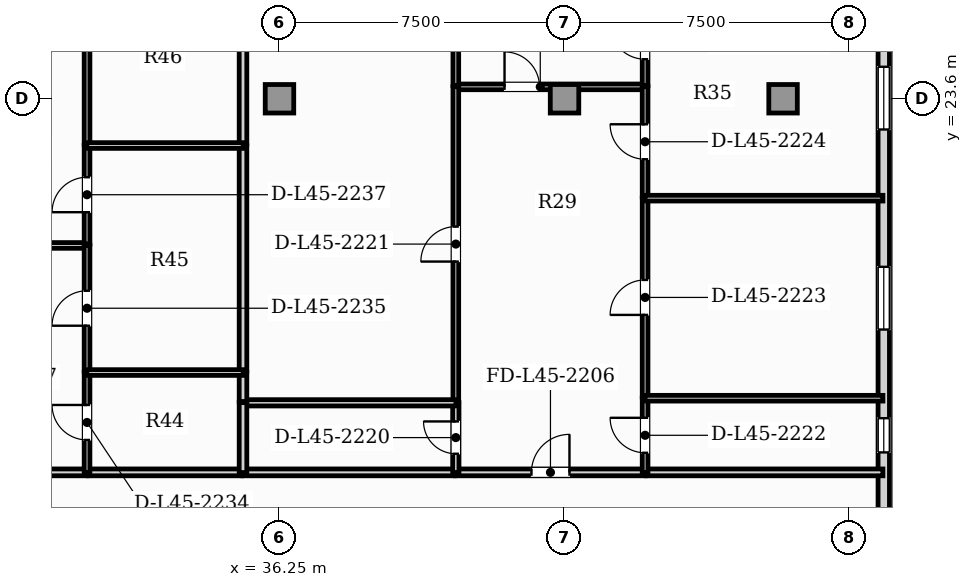
"""IFC4 building model, lengths in metres.
Left out: names, types, materials, properties, quantities, classifications, styles, units other than length and angle.
Written with IfcOpenShell. Run it as: python <this file> out.ifc"""

import sys

from ifc_helpers import new_model, si_unit, direction, frame, frame_2d, origin, origin_2d, place, context, subcontext, project, spatial, rectangle, extrude, element, fill, save


model = new_model("IFC4")
c1 = context("Model", 3, precision=1e-05, world=origin(), true_north=direction((0.0, 1.0)))
c2 = subcontext(c1, "Body", "Model", "MODEL_VIEW")
j1 = project(units=[si_unit("LENGTHUNIT", "METRE"), si_unit("PLANEANGLEUNIT", "RADIAN")], contexts=[c1])
p1 = place(None, origin())
s1 = spatial("IfcSite", under=j1, at=p1, CompositionType="ELEMENT")
p2 = place(p1, origin())
s2 = spatial("IfcBuilding", under=s1, at=p2, CompositionType="ELEMENT")
p3 = place(p2, frame((0.0, 0.0, 183.7)))
s3 = spatial("IfcBuildingStorey", under=s2, at=p3, CompositionType="ELEMENT", Elevation=183.7)
for number, where, z_axis, x_axis in (
    (1, (36.25, 23.6, 0.0), (0.0, 0.0, 1.0), (1.0, 0.0, 0.0)),
    (2, (43.75, 23.6, 0.0), (0.0, 0.0, 1.0), (1.0, 0.0, 0.0)),
    (3, (49.5, 23.6, 0.0), (0.0, 0.0, 1.0), (1.0, 0.0, 0.0)),
):
    element("IfcColumn", number, at=place(p3, frame(where, z_axis=z_axis, x_axis=x_axis)), inside=s3, PredefinedType="COLUMN", context=c2, shape_type="SweptSolid", body=[
        extrude(rectangle(XDim=0.75, YDim=0.75, at=origin_2d()), origin(), (0.0, 0.0, 1.0), 3.85),
    ])
p4 = place(p3, frame((52.15, 3.24, 0.0), z_axis=(0.0, 0.0, 1.0), x_axis=(0.0, 1.0, 0.0)))
e4 = element("IfcWall", 4, at=p4, inside=s3, PredefinedType="SOLIDWALL", context=c2, shape_type="SweptSolid", body=[
    extrude(rectangle(XDim=33.92, YDim=0.3, at=frame_2d((16.96, 0.0))), origin(), (0.0, 0.0, 1.0), 3.63),
])
p5 = place(p4, frame((30.56, 0.0, 0.95)))
e5 = element("IfcOpeningElement", 5, at=p5, cuts=e4, PredefinedType="OPENING", context=c2, shape_type="SweptSolid", body=[
    extrude(rectangle(XDim=0.9, YDim=1.5, at=frame_2d((0.45, 0.75))), frame((0.0, 0.16, 0.0), z_axis=(0.0, -1.0, 0.0), x_axis=(1.0, 0.0, 0.0)), (0.0, 0.0, 1.0), 0.32),
])
p6 = place(p4, frame((11.056, 0.0, 0.95)))
e6 = element("IfcOpeningElement", 6, at=p6, cuts=e4, PredefinedType="OPENING", context=c2, shape_type="SweptSolid", body=[
    extrude(rectangle(XDim=0.9, YDim=1.5, at=frame_2d((0.45, 0.75))), frame((0.0, 0.16, 0.0), z_axis=(0.0, -1.0, 0.0), x_axis=(1.0, 0.0, 0.0)), (0.0, 0.0, 1.0), 0.32),
])
p7 = place(p4, frame((14.288, 0.0, 0.88)))
e7 = element("IfcOpeningElement", 7, at=p7, cuts=e4, PredefinedType="OPENING", context=c2, shape_type="SweptSolid", body=[
    extrude(rectangle(XDim=1.65, YDim=2.0, at=frame_2d((0.825, 1.0))), frame((0.0, 0.16, 0.0), z_axis=(0.0, -1.0, 0.0), x_axis=(1.0, 0.0, 0.0)), (0.0, 0.0, 1.0), 0.32),
])
p8 = place(p4, frame((19.552, 0.0, 0.88)))
e8 = element("IfcOpeningElement", 8, at=p8, cuts=e4, PredefinedType="OPENING", context=c2, shape_type="SweptSolid", body=[
    extrude(rectangle(XDim=1.65, YDim=2.0, at=frame_2d((0.825, 1.0))), frame((0.0, 0.16, 0.0), z_axis=(0.0, -1.0, 0.0), x_axis=(1.0, 0.0, 0.0)), (0.0, 0.0, 1.0), 0.32),
])
p9 = place(p4, frame((25.809, 0.0, 0.88)))
e9 = element("IfcOpeningElement", 9, at=p9, cuts=e4, PredefinedType="OPENING", context=c2, shape_type="SweptSolid", body=[
    extrude(rectangle(XDim=1.65, YDim=2.0, at=frame_2d((0.825, 1.0))), frame((0.0, 0.16, 0.0), z_axis=(0.0, -1.0, 0.0), x_axis=(1.0, 0.0, 0.0)), (0.0, 0.0, 1.0), 0.32),
])
p10 = place(p4, frame((32.24, 0.0, 0.95)))
e10 = element("IfcOpeningElement", 10, at=p10, cuts=e4, PredefinedType="OPENING", context=c2, shape_type="SweptSolid", body=[
    extrude(rectangle(XDim=0.9, YDim=1.5, at=frame_2d((0.45, 0.75))), frame((0.0, 0.16, 0.0), z_axis=(0.0, -1.0, 0.0), x_axis=(1.0, 0.0, 0.0)), (0.0, 0.0, 1.0), 0.32),
])
p11 = place(p3, frame((40.885, 13.77, 0.0), z_axis=(0.0, 0.0, 1.0), x_axis=(1.0, 0.0, 0.0)))
e11 = element("IfcWall", 11, at=p11, inside=s3, PredefinedType="PARTITIONING", context=c2, shape_type="SweptSolid", body=[
    extrude(rectangle(XDim=4.99, YDim=0.18, at=frame_2d((2.495, 0.0))), origin(), (0.0, 0.0, 1.0), 3.63),
])
p12 = place(p11, frame((1.995, 0.0, 0.0)))
e12 = element("IfcOpeningElement", 12, at=p12, cuts=e11, PredefinedType="OPENING", context=c2, shape_type="SweptSolid", body=[
    extrude(rectangle(XDim=1.0, YDim=2.15, at=frame_2d((0.5, 1.075))), frame((0.0, 0.1, 0.0), z_axis=(0.0, -1.0, 0.0), x_axis=(1.0, 0.0, 0.0)), (0.0, 0.0, 1.0), 0.2),
])
p13 = place(p3, frame((35.285, 13.77, 0.0), z_axis=(0.0, 0.0, 1.0), x_axis=(1.0, 0.0, 0.0)))
e13 = element("IfcWall", 13, at=p13, inside=s3, PredefinedType="PARTITIONING", context=c2, shape_type="SweptSolid", body=[
    extrude(rectangle(XDim=5.57, YDim=0.18, at=frame_2d((2.785, 0.0))), origin(), (0.0, 0.0, 1.0), 3.63),
])
p14 = place(p3, frame((45.905, 13.77, 0.0), z_axis=(0.0, 0.0, 1.0), x_axis=(1.0, 0.0, 0.0)))
e14 = element("IfcWall", 14, at=p14, inside=s3, PredefinedType="PARTITIONING", context=c2, shape_type="SweptSolid", body=[
    extrude(rectangle(XDim=6.222, YDim=0.18, at=frame_2d((3.111, 0.0))), origin(), (0.0, 0.0, 1.0), 3.63),
])
p15 = place(p3, frame((26.201, 13.77, 0.0), z_axis=(0.0, 0.0, 1.0), x_axis=(1.0, 0.0, 0.0)))
e15 = element("IfcWall", 15, at=p15, inside=s3, PredefinedType="PARTITIONING", context=c2, shape_type="SweptSolid", body=[
    extrude(rectangle(XDim=4.99, YDim=0.18, at=frame_2d((2.495, 0.0))), origin(), (0.0, 0.0, 1.0), 3.63),
])
p16 = place(p15, frame((1.995, 0.0, 0.0)))
e16 = element("IfcOpeningElement", 16, at=p16, cuts=e15, PredefinedType="OPENING", context=c2, shape_type="SweptSolid", body=[
    extrude(rectangle(XDim=1.0, YDim=2.15, at=frame_2d((0.5, 1.075))), frame((0.0, 0.1, 0.0), z_axis=(0.0, -1.0, 0.0), x_axis=(1.0, 0.0, 0.0)), (0.0, 0.0, 1.0), 0.2),
])
p17 = place(p3, frame((31.221, 13.77, 0.0), z_axis=(0.0, 0.0, 1.0), x_axis=(1.0, 0.0, 0.0)))
e17 = element("IfcWall", 17, at=p17, inside=s3, PredefinedType="PARTITIONING", context=c2, shape_type="SweptSolid", body=[
    extrude(rectangle(XDim=4.034, YDim=0.18, at=frame_2d((2.017, 0.0))), origin(), (0.0, 0.0, 1.0), 3.63),
])
p18 = place(p3, frame((40.885, 23.913, 0.0), z_axis=(0.0, 0.0, 1.0), x_axis=(1.0, 0.0, 0.0)))
e18 = element("IfcWall", 18, at=p18, inside=s3, PredefinedType="PARTITIONING", context=c2, shape_type="SweptSolid", body=[
    extrude(rectangle(XDim=4.99, YDim=0.15, at=frame_2d((2.495, 0.0))), origin(), (0.0, 0.0, 1.0), 3.63),
])
p19 = place(p18, frame((1.287, 0.0, 0.0)))
e19 = element("IfcOpeningElement", 19, at=p19, cuts=e18, PredefinedType="OPENING", context=c2, shape_type="SweptSolid", body=[
    extrude(rectangle(XDim=0.92, YDim=2.1, at=frame_2d((0.46, 1.05))), frame((0.0, 0.085, 0.0), z_axis=(0.0, -1.0, 0.0), x_axis=(1.0, 0.0, 0.0)), (0.0, 0.0, 1.0), 0.17),
])
p20 = place(p3, frame((40.89, 13.765, 0.0), z_axis=(0.0, 0.0, 1.0), x_axis=(0.0, 1.0, 0.0)))
e20 = element("IfcWall", 20, at=p20, inside=s3, PredefinedType="PLUMBINGWALL", context=c2, shape_type="SweptSolid", body=[
    extrude(rectangle(XDim=1.84, YDim=0.165, at=frame_2d((0.92, 0.0))), origin(), (0.0, 0.0, 1.0), 3.63),
])
p21 = place(p20, frame((0.495, 0.0, 0.0)))
e21 = element("IfcOpeningElement", 21, at=p21, cuts=e20, PredefinedType="OPENING", context=c2, shape_type="SweptSolid", body=[
    extrude(rectangle(XDim=0.85, YDim=2.1, at=frame_2d((0.425, 1.05))), frame((0.0, 0.093, 0.0), z_axis=(0.0, -1.0, 0.0), x_axis=(1.0, 0.0, 0.0)), (0.0, 0.0, 1.0), 0.185),
])
p22 = place(p3, frame((40.89, 15.635, 0.0), z_axis=(0.0, 0.0, 1.0), x_axis=(0.0, 1.0, 0.0)))
e22 = element("IfcWall", 22, at=p22, inside=s3, PredefinedType="PARTITIONING", context=c2, shape_type="SweptSolid", body=[
    extrude(rectangle(XDim=8.283, YDim=0.15, at=frame_2d((4.142, 0.0))), origin(), (0.0, 0.0, 1.0), 3.63),
])
p23 = place(p22, frame((3.682, 0.0, 0.0)))
e23 = element("IfcOpeningElement", 23, at=p23, cuts=e22, PredefinedType="OPENING", context=c2, shape_type="SweptSolid", body=[
    extrude(rectangle(XDim=0.92, YDim=2.1, at=frame_2d((0.46, 1.05))), frame((0.0, 0.085, 0.0), z_axis=(0.0, -1.0, 0.0), x_axis=(1.0, 0.0, 0.0)), (0.0, 0.0, 1.0), 0.17),
])
p24 = place(p3, frame((45.87, 13.765, 0.0), z_axis=(0.0, 0.0, 1.0), x_axis=(0.0, 1.0, 0.0)))
e24 = element("IfcWall", 24, at=p24, inside=s3, PredefinedType="PARTITIONING", context=c2, shape_type="SweptSolid", body=[
    extrude(rectangle(XDim=1.961, YDim=0.15, at=frame_2d((0.981, 0.0))), origin(), (0.0, 0.0, 1.0), 3.63),
])
p25 = place(p24, frame((0.521, 0.0, 0.0)))
e25 = element("IfcOpeningElement", 25, at=p25, cuts=e24, PredefinedType="OPENING", context=c2, shape_type="SweptSolid", body=[
    extrude(rectangle(XDim=0.92, YDim=2.1, at=frame_2d((0.46, 1.05))), frame((0.0, 0.085, 0.0), z_axis=(0.0, -1.0, 0.0), x_axis=(1.0, 0.0, 0.0)), (0.0, 0.0, 1.0), 0.17),
])
p26 = place(p3, frame((45.87, 15.756, 0.0), z_axis=(0.0, 0.0, 1.0), x_axis=(0.0, 1.0, 0.0)))
e26 = element("IfcWall", 26, at=p26, inside=s3, PredefinedType="PARTITIONING", context=c2, shape_type="SweptSolid", body=[
    extrude(rectangle(XDim=5.234, YDim=0.15, at=frame_2d((2.617, 0.0))), origin(), (0.0, 0.0, 1.0), 3.63),
])
p27 = place(p26, frame((2.157, 0.0, 0.0)))
e27 = element("IfcOpeningElement", 27, at=p27, cuts=e26, PredefinedType="OPENING", context=c2, shape_type="SweptSolid", body=[
    extrude(rectangle(XDim=0.92, YDim=2.1, at=frame_2d((0.46, 1.05))), frame((0.0, 0.085, 0.0), z_axis=(0.0, -1.0, 0.0), x_axis=(1.0, 0.0, 0.0)), (0.0, 0.0, 1.0), 0.17),
])
p28 = place(p3, frame((45.87, 21.02, 0.0), z_axis=(0.0, 0.0, 1.0), x_axis=(0.0, 1.0, 0.0)))
e28 = element("IfcWall", 28, at=p28, inside=s3, PredefinedType="PARTITIONING", context=c2, shape_type="SweptSolid", body=[
    extrude(rectangle(XDim=2.898, YDim=0.15, at=frame_2d((1.449, 0.0))), origin(), (0.0, 0.0, 1.0), 3.63),
])
p29 = place(p28, frame((0.989, 0.0, 0.0)))
e29 = element("IfcOpeningElement", 29, at=p29, cuts=e28, PredefinedType="OPENING", context=c2, shape_type="SweptSolid", body=[
    extrude(rectangle(XDim=0.92, YDim=2.1, at=frame_2d((0.46, 1.05))), frame((0.0, 0.085, 0.0), z_axis=(0.0, -1.0, 0.0), x_axis=(1.0, 0.0, 0.0)), (0.0, 0.0, 1.0), 0.17),
])
p30 = place(p3, frame((40.89, 23.948, 0.0), z_axis=(0.0, 0.0, 1.0), x_axis=(0.0, 1.0, 0.0)))
e30 = element("IfcWall", 30, at=p30, inside=s3, PredefinedType="PARTITIONING", context=c2, shape_type="SweptSolid", body=[
    extrude(rectangle(XDim=9.557, YDim=0.15, at=frame_2d((4.778, 0.0))), origin(), (0.0, 0.0, 1.0), 3.63),
])
p31 = place(p30, frame((4.318, 0.0, 0.0)))
e31 = element("IfcOpeningElement", 31, at=p31, cuts=e30, PredefinedType="OPENING", context=c2, shape_type="SweptSolid", body=[
    extrude(rectangle(XDim=0.92, YDim=2.1, at=frame_2d((0.46, 1.05))), frame((0.0, 0.085, 0.0), z_axis=(0.0, -1.0, 0.0), x_axis=(1.0, 0.0, 0.0)), (0.0, 0.0, 1.0), 0.17),
])
p32 = place(p3, frame((45.87, 23.948, 0.0), z_axis=(0.0, 0.0, 1.0), x_axis=(0.0, 1.0, 0.0)))
e32 = element("IfcWall", 32, at=p32, inside=s3, PredefinedType="PARTITIONING", context=c2, shape_type="SweptSolid", body=[
    extrude(rectangle(XDim=2.305, YDim=0.15, at=frame_2d((1.153, 0.0))), origin(), (0.0, 0.0, 1.0), 3.63),
])
p33 = place(p32, frame((0.693, 0.0, 0.0)))
e33 = element("IfcOpeningElement", 33, at=p33, cuts=e32, PredefinedType="OPENING", context=c2, shape_type="SweptSolid", body=[
    extrude(rectangle(XDim=0.92, YDim=2.1, at=frame_2d((0.46, 1.05))), frame((0.0, 0.085, 0.0), z_axis=(0.0, -1.0, 0.0), x_axis=(1.0, 0.0, 0.0)), (0.0, 0.0, 1.0), 0.17),
])
p34 = place(p3, frame((35.285, 15.6, 0.0), z_axis=(0.0, 0.0, 1.0), x_axis=(1.0, 0.0, 0.0)))
e34 = element("IfcWall", 34, at=p34, inside=s3, PredefinedType="PLUMBINGWALL", context=c2, shape_type="SweptSolid", body=[
    extrude(rectangle(XDim=5.61, YDim=0.165, at=frame_2d((2.805, 0.0))), origin(), (0.0, 0.0, 1.0), 3.63),
])
p35 = place(p3, frame((35.29, 13.765, 0.0), z_axis=(0.0, 0.0, 1.0), x_axis=(0.0, 1.0, 0.0)))
e35 = element("IfcWall", 35, at=p35, inside=s3, PredefinedType="PARTITIONING", context=c2, shape_type="SweptSolid", body=[
    extrude(rectangle(XDim=1.84, YDim=0.2, at=frame_2d((0.92, 0.0))), origin(), (0.0, 0.0, 1.0), 3.63),
])
p36 = place(p3, frame((35.29, 15.635, 0.0), z_axis=(0.0, 0.0, 1.0), x_axis=(0.0, 1.0, 0.0)))
e36 = element("IfcWall", 36, at=p36, inside=s3, PredefinedType="PARTITIONING", context=c2, shape_type="SweptSolid", body=[
    extrude(rectangle(XDim=0.767, YDim=0.2, at=frame_2d((0.383, 0.0))), origin(), (0.0, 0.0, 1.0), 3.63),
])
p37 = place(p3, frame((35.29, 16.432, 0.0), z_axis=(0.0, 0.0, 1.0), x_axis=(0.0, 1.0, 0.0)))
e37 = element("IfcWall", 37, at=p37, inside=s3, PredefinedType="PARTITIONING", context=c2, shape_type="SweptSolid", body=[
    extrude(rectangle(XDim=5.943, YDim=0.2, at=frame_2d((2.972, 0.0))), origin(), (0.0, 0.0, 1.0), 3.63),
])
p38 = place(p3, frame((35.29, 22.405, 0.0), z_axis=(0.0, 0.0, 1.0), x_axis=(0.0, 1.0, 0.0)))
e38 = element("IfcWall", 38, at=p38, inside=s3, PredefinedType="PARTITIONING", context=c2, shape_type="SweptSolid", body=[
    extrude(rectangle(XDim=7.74, YDim=0.2, at=frame_2d((3.87, 0.0))), origin(), (0.0, 0.0, 1.0), 3.63),
])
for number, where, z_axis, x_axis in (
    (39, (45.865, 15.721, 0.0), (0.0, 0.0, 1.0), (1.0, 0.0, 0.0)),
    (40, (45.865, 20.985, 0.0), (0.0, 0.0, 1.0), (1.0, 0.0, 0.0)),
):
    element("IfcWall", number, at=place(p3, frame(where, z_axis=z_axis, x_axis=x_axis)), inside=s3, PredefinedType="PARTITIONING", context=c2, shape_type="SweptSolid", body=[
        extrude(rectangle(XDim=6.262, YDim=0.15, at=frame_2d((3.131, 0.0))), origin(), (0.0, 0.0, 1.0), 3.63),
    ])
p39 = place(p3, frame((26.201, 19.741, 0.0), z_axis=(0.0, 0.0, 1.0), x_axis=(1.0, 0.0, 0.0)))
e41 = element("IfcWall", 41, at=p39, inside=s3, PredefinedType="PARTITIONING", context=c2, shape_type="SweptSolid", body=[
    extrude(rectangle(XDim=4.99, YDim=0.15, at=frame_2d((2.495, 0.0))), origin(), (0.0, 0.0, 1.0), 3.63),
])
p40 = place(p39, frame((2.035, 0.0, 0.0)))
e42 = element("IfcOpeningElement", 42, at=p40, cuts=e41, PredefinedType="OPENING", context=c2, shape_type="SweptSolid", body=[
    extrude(rectangle(XDim=0.92, YDim=2.1, at=frame_2d((0.46, 1.05))), frame((0.0, 0.085, 0.0), z_axis=(0.0, -1.0, 0.0), x_axis=(1.0, 0.0, 0.0)), (0.0, 0.0, 1.0), 0.17),
])
p41 = place(p3, frame((31.186, 13.765, 0.0), z_axis=(0.0, 0.0, 1.0), x_axis=(0.0, 1.0, 0.0)))
e43 = element("IfcWall", 43, at=p41, inside=s3, PredefinedType="PARTITIONING", context=c2, shape_type="SweptSolid", body=[
    extrude(rectangle(XDim=2.637, YDim=0.15, at=frame_2d((1.318, 0.0))), origin(), (0.0, 0.0, 1.0), 3.63),
])
p42 = place(p41, frame((0.858, 0.0, 0.0)))
e44 = element("IfcOpeningElement", 44, at=p42, cuts=e43, PredefinedType="OPENING", context=c2, shape_type="SweptSolid", body=[
    extrude(rectangle(XDim=0.92, YDim=2.1, at=frame_2d((0.46, 1.05))), frame((0.0, 0.085, 0.0), z_axis=(0.0, -1.0, 0.0), x_axis=(1.0, 0.0, 0.0)), (0.0, 0.0, 1.0), 0.17),
])
p43 = place(p3, frame((31.186, 16.432, 0.0), z_axis=(0.0, 0.0, 1.0), x_axis=(0.0, 1.0, 0.0)))
e45 = element("IfcWall", 45, at=p43, inside=s3, PredefinedType="PARTITIONING", context=c2, shape_type="SweptSolid", body=[
    extrude(rectangle(XDim=3.314, YDim=0.15, at=frame_2d((1.657, 0.0))), origin(), (0.0, 0.0, 1.0), 3.63),
])
p44 = place(p43, frame((1.197, 0.0, 0.0)))
e46 = element("IfcOpeningElement", 46, at=p44, cuts=e45, PredefinedType="OPENING", context=c2, shape_type="SweptSolid", body=[
    extrude(rectangle(XDim=0.92, YDim=2.1, at=frame_2d((0.46, 1.05))), frame((0.0, 0.085, 0.0), z_axis=(0.0, -1.0, 0.0), x_axis=(1.0, 0.0, 0.0)), (0.0, 0.0, 1.0), 0.17),
])
p45 = place(p3, frame((31.186, 19.776, 0.0), z_axis=(0.0, 0.0, 1.0), x_axis=(0.0, 1.0, 0.0)))
e47 = element("IfcWall", 47, at=p45, inside=s3, PredefinedType="PARTITIONING", context=c2, shape_type="SweptSolid", body=[
    extrude(rectangle(XDim=2.599, YDim=0.15, at=frame_2d((1.3, 0.0))), origin(), (0.0, 0.0, 1.0), 3.63),
])
p46 = place(p45, frame((0.84, 0.0, 0.0)))
e48 = element("IfcOpeningElement", 48, at=p46, cuts=e47, PredefinedType="OPENING", context=c2, shape_type="SweptSolid", body=[
    extrude(rectangle(XDim=0.92, YDim=2.1, at=frame_2d((0.46, 1.05))), frame((0.0, 0.085, 0.0), z_axis=(0.0, -1.0, 0.0), x_axis=(1.0, 0.0, 0.0)), (0.0, 0.0, 1.0), 0.17),
])
p47 = place(p3, frame((31.186, 22.405, 0.0), z_axis=(0.0, 0.0, 1.0), x_axis=(0.0, 1.0, 0.0)))
e49 = element("IfcWall", 49, at=p47, inside=s3, PredefinedType="PARTITIONING", context=c2, shape_type="SweptSolid", body=[
    extrude(rectangle(XDim=7.78, YDim=0.15, at=frame_2d((3.89, 0.0))), origin(), (0.0, 0.0, 1.0), 3.63),
])
p48 = place(p47, frame((3.43, 0.0, 0.0)))
e50 = element("IfcOpeningElement", 50, at=p48, cuts=e49, PredefinedType="OPENING", context=c2, shape_type="SweptSolid", body=[
    extrude(rectangle(XDim=0.92, YDim=2.1, at=frame_2d((0.46, 1.05))), frame((0.0, 0.085, 0.0), z_axis=(0.0, -1.0, 0.0), x_axis=(1.0, 0.0, 0.0)), (0.0, 0.0, 1.0), 0.17),
])
for number, where, z_axis, x_axis in (
    (51, (31.181, 16.397, 0.0), (0.0, 0.0, 1.0), (1.0, 0.0, 0.0)),
    (52, (31.181, 22.37, 0.0), (0.0, 0.0, 1.0), (1.0, 0.0, 0.0)),
):
    element("IfcWall", number, at=place(p3, frame(where, z_axis=z_axis, x_axis=x_axis)), inside=s3, PredefinedType="PARTITIONING", context=c2, shape_type="SweptSolid", body=[
        extrude(rectangle(XDim=4.114, YDim=0.15, at=frame_2d((2.057, 0.0))), origin(), (0.0, 0.0, 1.0), 3.63),
    ])
p49 = place(p6, origin())
e53 = element("IfcWindow", 53, at=p49, inside=s3, PartitioningType="SINGLE_PANEL", PredefinedType="WINDOW", context=c2, shape_type="SweptSolid", body=[
    extrude(rectangle(XDim=0.9, YDim=1.5, at=frame_2d((0.45, 0.75))), frame((0.0, 0.03, 0.0), z_axis=(0.0, -1.0, 0.0), x_axis=(1.0, 0.0, 0.0)), (0.0, 0.0, 1.0), 0.06),
])
fill(e6, e53)
p50 = place(p7, origin())
e54 = element("IfcWindow", 54, at=p50, inside=s3, PartitioningType="SINGLE_PANEL", PredefinedType="WINDOW", context=c2, shape_type="SweptSolid", body=[
    extrude(rectangle(XDim=1.65, YDim=2.0, at=frame_2d((0.825, 1.0))), frame((0.0, 0.03, 0.0), z_axis=(0.0, -1.0, 0.0), x_axis=(1.0, 0.0, 0.0)), (0.0, 0.0, 1.0), 0.06),
])
fill(e7, e54)
p51 = place(p8, origin())
e55 = element("IfcWindow", 55, at=p51, inside=s3, PartitioningType="SINGLE_PANEL", PredefinedType="WINDOW", context=c2, shape_type="SweptSolid", body=[
    extrude(rectangle(XDim=1.65, YDim=2.0, at=frame_2d((0.825, 1.0))), frame((0.0, 0.03, 0.0), z_axis=(0.0, -1.0, 0.0), x_axis=(1.0, 0.0, 0.0)), (0.0, 0.0, 1.0), 0.06),
])
fill(e8, e55)
p52 = place(p12, origin())
e56 = element("IfcDoor", 56, at=p52, inside=s3, OperationType="SINGLE_SWING_RIGHT", PredefinedType="DOOR", context=c2, shape_type="SweptSolid", body=[
    extrude(rectangle(XDim=1.0, YDim=2.15, at=frame_2d((0.5, 1.075))), frame((0.0, 0.025, 0.0), z_axis=(0.0, -1.0, 0.0), x_axis=(1.0, 0.0, 0.0)), (0.0, 0.0, 1.0), 0.05),
])
fill(e12, e56)
p53 = place(p19, origin())
e57 = element("IfcDoor", 57, at=p53, inside=s3, OperationType="SINGLE_SWING_LEFT", PredefinedType="DOOR", context=c2, shape_type="SweptSolid", body=[
    extrude(rectangle(XDim=0.92, YDim=2.1, at=frame_2d((0.46, 1.05))), frame((0.0, 0.025, 0.0), z_axis=(0.0, -1.0, 0.0), x_axis=(1.0, 0.0, 0.0)), (0.0, 0.0, 1.0), 0.05),
])
fill(e19, e57)
p54 = place(p21, origin())
e58 = element("IfcDoor", 58, at=p54, inside=s3, OperationType="SINGLE_SWING_RIGHT", PredefinedType="DOOR", context=c2, shape_type="SweptSolid", body=[
    extrude(rectangle(XDim=0.85, YDim=2.1, at=frame_2d((0.425, 1.05))), frame((0.0, 0.025, 0.0), z_axis=(0.0, -1.0, 0.0), x_axis=(1.0, 0.0, 0.0)), (0.0, 0.0, 1.0), 0.05),
])
fill(e21, e58)
p55 = place(p23, origin())
e59 = element("IfcDoor", 59, at=p55, inside=s3, OperationType="SINGLE_SWING_LEFT", PredefinedType="DOOR", context=c2, shape_type="SweptSolid", body=[
    extrude(rectangle(XDim=0.92, YDim=2.1, at=frame_2d((0.46, 1.05))), frame((0.0, 0.025, 0.0), z_axis=(0.0, -1.0, 0.0), x_axis=(1.0, 0.0, 0.0)), (0.0, 0.0, 1.0), 0.05),
])
fill(e23, e59)
p56 = place(p25, origin())
e60 = element("IfcDoor", 60, at=p56, inside=s3, OperationType="SINGLE_SWING_RIGHT", PredefinedType="DOOR", context=c2, shape_type="SweptSolid", body=[
    extrude(rectangle(XDim=0.92, YDim=2.1, at=frame_2d((0.46, 1.05))), frame((0.0, 0.025, 0.0), z_axis=(0.0, -1.0, 0.0), x_axis=(1.0, 0.0, 0.0)), (0.0, 0.0, 1.0), 0.05),
])
fill(e25, e60)
p57 = place(p27, origin())
e61 = element("IfcDoor", 61, at=p57, inside=s3, OperationType="SINGLE_SWING_LEFT", PredefinedType="DOOR", context=c2, shape_type="SweptSolid", body=[
    extrude(rectangle(XDim=0.92, YDim=2.1, at=frame_2d((0.46, 1.05))), frame((0.0, 0.025, 0.0), z_axis=(0.0, -1.0, 0.0), x_axis=(1.0, 0.0, 0.0)), (0.0, 0.0, 1.0), 0.05),
])
fill(e27, e61)
p58 = place(p29, origin())
e62 = element("IfcDoor", 62, at=p58, inside=s3, OperationType="SINGLE_SWING_RIGHT", PredefinedType="DOOR", context=c2, shape_type="SweptSolid", body=[
    extrude(rectangle(XDim=0.92, YDim=2.1, at=frame_2d((0.46, 1.05))), frame((0.0, 0.025, 0.0), z_axis=(0.0, -1.0, 0.0), x_axis=(1.0, 0.0, 0.0)), (0.0, 0.0, 1.0), 0.05),
])
fill(e29, e62)
p59 = place(p33, origin())
e63 = element("IfcDoor", 63, at=p59, inside=s3, OperationType="SINGLE_SWING_RIGHT", PredefinedType="DOOR", context=c2, shape_type="SweptSolid", body=[
    extrude(rectangle(XDim=0.92, YDim=2.1, at=frame_2d((0.46, 1.05))), frame((0.0, 0.025, 0.0), z_axis=(0.0, -1.0, 0.0), x_axis=(1.0, 0.0, 0.0)), (0.0, 0.0, 1.0), 0.05),
])
fill(e33, e63)
p60 = place(p42, origin())
e64 = element("IfcDoor", 64, at=p60, inside=s3, OperationType="SINGLE_SWING_RIGHT", PredefinedType="DOOR", context=c2, shape_type="SweptSolid", body=[
    extrude(rectangle(XDim=0.92, YDim=2.1, at=frame_2d((0.46, 1.05))), frame((0.0, 0.025, 0.0), z_axis=(0.0, -1.0, 0.0), x_axis=(1.0, 0.0, 0.0)), (0.0, 0.0, 1.0), 0.05),
])
fill(e44, e64)
p61 = place(p44, origin())
e65 = element("IfcDoor", 65, at=p61, inside=s3, OperationType="SINGLE_SWING_LEFT", PredefinedType="DOOR", context=c2, shape_type="SweptSolid", body=[
    extrude(rectangle(XDim=0.92, YDim=2.1, at=frame_2d((0.46, 1.05))), frame((0.0, 0.025, 0.0), z_axis=(0.0, -1.0, 0.0), x_axis=(1.0, 0.0, 0.0)), (0.0, 0.0, 1.0), 0.05),
])
fill(e46, e65)
p62 = place(p46, origin())
e66 = element("IfcDoor", 66, at=p62, inside=s3, OperationType="SINGLE_SWING_LEFT", PredefinedType="DOOR", context=c2, shape_type="SweptSolid", body=[
    extrude(rectangle(XDim=0.92, YDim=2.1, at=frame_2d((0.46, 1.05))), frame((0.0, 0.025, 0.0), z_axis=(0.0, -1.0, 0.0), x_axis=(1.0, 0.0, 0.0)), (0.0, 0.0, 1.0), 0.05),
])
fill(e48, e66)
save(model, sys.argv[1])
